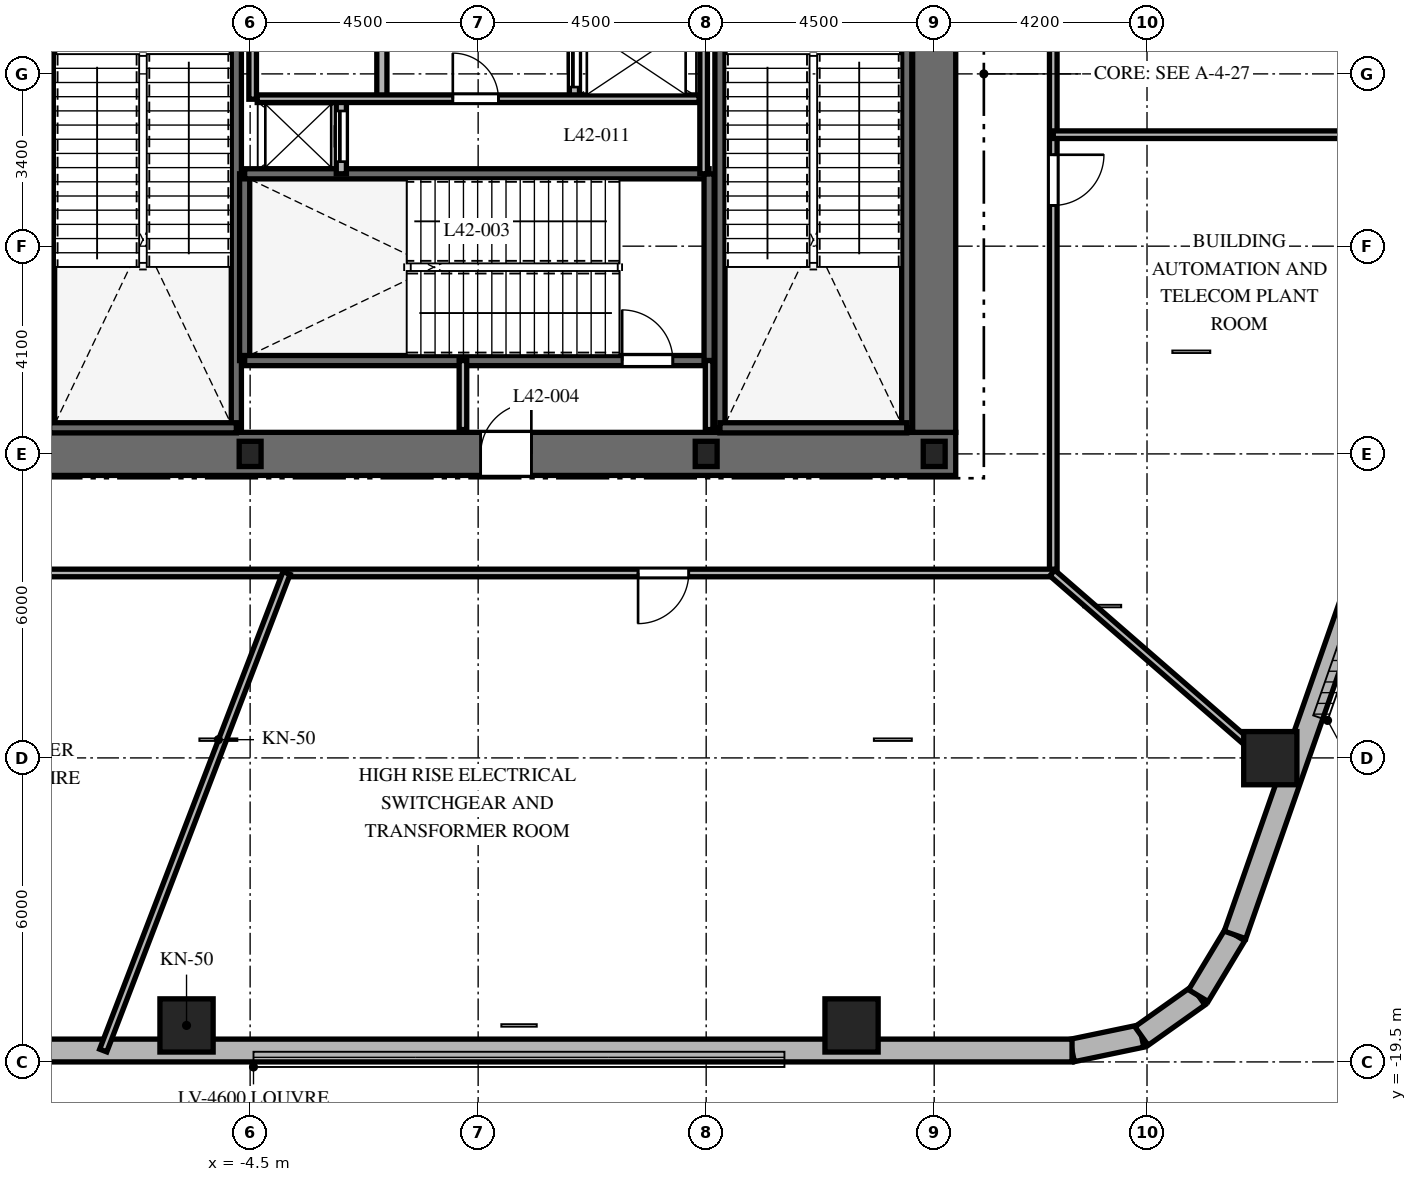
"""IFC4 building model, lengths in metres.
Left out: names, types, materials, properties, quantities, classifications, styles, units other than length and angle.
Written with IfcOpenShell. Run it as: python <this file> out.ifc"""

import sys

from ifc_helpers import new_model, si_unit, direction, frame, frame_2d, origin, origin_2d, place, context, subcontext, project, spatial, rectangle, i_section, extrude, element, fill, save


model = new_model("IFC4")
c1 = context("Model", 3, precision=1e-05, world=origin(), true_north=direction((0.0, 1.0)))
c2 = subcontext(c1, "Body", "Model", "MODEL_VIEW")
j1 = project(units=[si_unit("LENGTHUNIT", "METRE"), si_unit("PLANEANGLEUNIT", "RADIAN")], contexts=[c1])
p1 = place(None, origin())
s1 = spatial("IfcSite", under=j1, at=p1, CompositionType="ELEMENT")
p2 = place(p1, origin())
s2 = spatial("IfcBuilding", under=s1, at=p2, CompositionType="ELEMENT")
p3 = place(p2, frame((0.0, 0.0, 170.2)))
s3 = spatial("IfcBuildingStorey", under=s2, at=p3, CompositionType="ELEMENT", Elevation=170.2)
p4 = place(p3, frame((-9.425, -7.5, 0.0), z_axis=(0.0, 0.0, 1.0), x_axis=(1.0, 0.0, 0.0)))
e1 = element("IfcWall", 1, at=p4, inside=s3, PredefinedType="SHEAR", context=c2, shape_type="SweptSolid", body=[
    extrude(rectangle(XDim=18.85, YDim=0.85, at=frame_2d((9.425, 0.0))), origin(), (0.0, 0.0, 1.0), 5.4),
])
p5 = place(p4, frame((9.475, 0.0, 0.0)))
e2 = element("IfcOpeningElement", 2, at=p5, cuts=e1, PredefinedType="OPENING", context=c2, shape_type="SweptSolid", body=[
    extrude(rectangle(XDim=1.0, YDim=2.15, at=frame_2d((0.5, 1.075))), frame((0.0, 0.435, 0.0), z_axis=(0.0, -1.0, 0.0), x_axis=(1.0, 0.0, 0.0)), (0.0, 0.0, 1.0), 0.87),
])
p6 = place(p3, frame((9.0, -7.075, 0.0), z_axis=(0.0, 0.0, 1.0), x_axis=(0.0, 1.0, 0.0)))
e3 = element("IfcWall", 3, at=p6, inside=s3, PredefinedType="SHEAR", context=c2, shape_type="SweptSolid", body=[
    extrude(rectangle(XDim=14.15, YDim=0.85, at=frame_2d((7.075, 0.0))), origin(), (0.0, 0.0, 1.0), 5.4),
])
p7 = place(p6, frame((10.2, 0.0, 0.0)))
e4 = element("IfcOpeningElement", 4, at=p7, cuts=e3, PredefinedType="OPENING", context=c2, shape_type="SweptSolid", body=[
    extrude(rectangle(XDim=1.05, YDim=2.15, at=frame_2d((0.525, 1.075))), frame((0.0, 0.435, 0.0), z_axis=(0.0, -1.0, 0.0), x_axis=(1.0, 0.0, 0.0)), (0.0, 0.0, 1.0), 0.87),
])
for number, where, z_axis, x_axis in (
    (5, (-8.458, -6.985, 0.0), (0.0, 0.0, 1.0), (0.0, 1.0, 0.0)),
    (6, (-4.772, -6.985, 0.0), (0.0, 0.0, 1.0), (0.0, 1.0, 0.0)),
):
    element("IfcWall", number, at=place(p3, frame(where, z_axis=z_axis, x_axis=x_axis)), inside=s3, PredefinedType="SHEAR", context=c2, shape_type="SweptSolid", body=[
        extrude(rectangle(XDim=9.143, YDim=0.2, at=frame_2d((4.572, 0.0))), origin(), (0.0, 0.0, 1.0), 5.4),
    ])
p8 = place(p3, frame((-8.458, -6.985, 0.0), z_axis=(0.0, 0.0, 1.0), x_axis=(1.0, 0.0, 0.0)))
e7 = element("IfcWall", 7, at=p8, inside=s3, PredefinedType="SHEAR", context=c2, shape_type="SweptSolid", body=[
    extrude(rectangle(XDim=3.686, YDim=0.2, at=frame_2d((1.843, 0.0))), origin(), (0.0, 0.0, 1.0), 5.4),
])
for number, where, z_axis, x_axis in (
    (8, (4.772, -6.985, 0.0), (0.0, 0.0, 1.0), (0.0, 1.0, 0.0)),
    (9, (8.458, -6.985, 0.0), (0.0, 0.0, 1.0), (0.0, 1.0, 0.0)),
):
    element("IfcWall", number, at=place(p3, frame(where, z_axis=z_axis, x_axis=x_axis)), inside=s3, PredefinedType="SHEAR", context=c2, shape_type="SweptSolid", body=[
        extrude(rectangle(XDim=9.143, YDim=0.2, at=frame_2d((4.572, 0.0))), origin(), (0.0, 0.0, 1.0), 5.4),
    ])
for number, where, z_axis, x_axis in (
    (10, (4.772, -6.985, 0.0), (0.0, 0.0, 1.0), (1.0, 0.0, 0.0)),
    (11, (-4.608, -5.658, 0.0), (0.0, 0.0, 1.0), (0.0, 1.0, 0.0)),
):
    element("IfcWall", number, at=place(p3, frame(where, z_axis=z_axis, x_axis=x_axis)), inside=s3, PredefinedType="SHEAR", context=c2, shape_type="SweptSolid", body=[
        extrude(rectangle(XDim=3.686, YDim=0.2, at=frame_2d((1.843, 0.0))), origin(), (0.0, 0.0, 1.0), 5.4),
    ])
p9 = place(p3, frame((-4.608, -5.658, 0.0), z_axis=(0.0, 0.0, 1.0), x_axis=(1.0, 0.0, 0.0)))
e12 = element("IfcWall", 12, at=p9, inside=s3, PredefinedType="SHEAR", context=c2, shape_type="SweptSolid", body=[
    extrude(rectangle(XDim=9.166, YDim=0.2, at=frame_2d((4.583, 0.0))), origin(), (0.0, 0.0, 1.0), 5.4),
])
p10 = place(p9, frame((7.45, 0.0, 0.0)))
e13 = element("IfcOpeningElement", 13, at=p10, cuts=e12, PredefinedType="OPENING", context=c2, shape_type="SweptSolid", body=[
    extrude(rectangle(XDim=1.0, YDim=2.15, at=frame_2d((0.5, 1.075))), frame((0.0, 0.11, 0.0), z_axis=(0.0, -1.0, 0.0), x_axis=(1.0, 0.0, 0.0)), (0.0, 0.0, 1.0), 0.22),
])
p11 = place(p3, frame((-4.608, -1.972, 0.0), z_axis=(0.0, 0.0, 1.0), x_axis=(1.0, 0.0, 0.0)))
e14 = element("IfcWall", 14, at=p11, inside=s3, PredefinedType="SHEAR", context=c2, shape_type="SweptSolid", body=[
    extrude(rectangle(XDim=9.166, YDim=0.2, at=frame_2d((4.583, 0.0))), origin(), (0.0, 0.0, 1.0), 5.4),
])
p12 = place(p3, frame((4.558, -5.658, 0.0), z_axis=(0.0, 0.0, 1.0), x_axis=(0.0, 1.0, 0.0)))
e15 = element("IfcWall", 15, at=p12, inside=s3, PredefinedType="SHEAR", context=c2, shape_type="SweptSolid", body=[
    extrude(rectangle(XDim=3.686, YDim=0.2, at=frame_2d((1.843, 0.0))), origin(), (0.0, 0.0, 1.0), 5.4),
])
for number, where, z_axis, x_axis in (
    (16, (-4.5, -7.5, 0.0), (0.0, 0.0, 1.0), (1.0, 0.0, 0.0)),
    (17, (4.5, -7.5, 0.0), (0.0, 0.0, 1.0), (1.0, 0.0, 0.0)),
    (18, (9.0, -7.5, 0.0), (0.0, 0.0, 1.0), (1.0, 0.0, 0.0)),
):
    element("IfcColumn", number, at=place(p3, frame(where, z_axis=z_axis, x_axis=x_axis)), inside=s3, PredefinedType="COLUMN", context=c2, shape_type="SweptSolid", body=[
        extrude(i_section(OverallWidth=0.432, OverallDepth=0.498, WebThickness=0.056, FlangeThickness=0.089, at=origin_2d()), origin(), (0.0, 0.0, 1.0), 5.4),
    ])
for number, where, z_axis, x_axis in (
    (19, (-5.755, -18.78, 0.0), (0.0, 0.0, 1.0), (1.0, 0.0, 0.0)),
    (20, (7.369, -18.78, 0.0), (0.0, 0.0, 1.0), (1.0, 0.0, 0.0)),
    (21, (15.633, -13.505, 0.0), (0.0, 0.0, 1.0), (1.0, 0.0, 0.0)),
):
    element("IfcColumn", number, at=place(p3, frame(where, z_axis=z_axis, x_axis=x_axis)), inside=s3, PredefinedType="COLUMN", context=c2, shape_type="SweptSolid", body=[
        extrude(rectangle(XDim=1.05, YDim=1.05, at=origin_2d()), origin(), (0.0, 0.0, 1.0), 5.4),
    ])
p13 = place(p3, frame((11.72, -19.275, 0.0), z_axis=(0.0, 0.0, 1.0), x_axis=(0.97893106758, 0.204191001093, 0.0)))
e22 = element("IfcWall", 22, at=p13, inside=s3, PredefinedType="SOLIDWALL", context=c2, shape_type="SweptSolid", body=[
    extrude(rectangle(XDim=1.4, YDim=0.45, at=frame_2d((0.7, 0.0))), origin(), (0.0, 0.0, 1.0), 5.1),
])
p14 = place(p3, frame((13.091, -18.989, 0.0), z_axis=(0.0, 0.0, 1.0), x_axis=(0.815574637848, 0.578651890258, 0.0)))
e23 = element("IfcWall", 23, at=p14, inside=s3, PredefinedType="SOLIDWALL", context=c2, shape_type="SweptSolid", body=[
    extrude(rectangle(XDim=1.377, YDim=0.45, at=frame_2d((0.688, 0.0))), origin(), (0.0, 0.0, 1.0), 5.1),
])
p15 = place(p3, frame((14.214, -18.192, 0.0), z_axis=(0.0, 0.0, 1.0), x_axis=(0.516340945502, 0.856383108193, 0.0)))
e24 = element("IfcWall", 24, at=p15, inside=s3, PredefinedType="SOLIDWALL", context=c2, shape_type="SweptSolid", body=[
    extrude(rectangle(XDim=1.4, YDim=0.45, at=frame_2d((0.7, 0.0))), origin(), (0.0, 0.0, 1.0), 5.1),
])
p16 = place(p3, frame((-10.108, -19.275, 0.0), z_axis=(0.0, 0.0, 1.0), x_axis=(1.0, 0.0, 0.0)))
e25 = element("IfcWall", 25, at=p16, inside=s3, PredefinedType="SOLIDWALL", context=c2, shape_type="SweptSolid", body=[
    extrude(rectangle(XDim=21.829, YDim=0.45, at=frame_2d((10.915, 0.0))), origin(), (0.0, 0.0, 1.0), 5.1),
])
p17 = place(p3, frame((14.937, -16.993, 0.0), z_axis=(0.0, 0.0, 1.0), x_axis=(0.330431575061, 0.943829949834, 0.0)))
e26 = element("IfcWall", 26, at=p17, inside=s3, PredefinedType="SOLIDWALL", context=c2, shape_type="SweptSolid", body=[
    extrude(rectangle(XDim=17.689, YDim=0.45, at=frame_2d((8.844, 0.0))), origin(), (0.0, 0.0, 1.0), 5.1),
])
for number, where, z_axis, x_axis in (
    (27, (-0.3, -7.02, 0.0), (0.0, 0.0, 1.0), (0.0, 1.0, 0.0)),
    (28, (4.558, -7.02, 0.0), (0.0, 0.0, 1.0), (0.0, 1.0, 0.0)),
):
    element("IfcWall", number, at=place(p3, frame(where, z_axis=z_axis, x_axis=x_axis)), inside=s3, PredefinedType="PARTITIONING", context=c2, shape_type="SweptSolid", body=[
        extrude(rectangle(XDim=1.362, YDim=0.15, at=frame_2d((0.681, 0.0))), origin(), (0.0, 0.0, 1.0), 5.1),
    ])
p18 = place(p3, frame((-2.7, -1.972, 0.0), z_axis=(0.0, 0.0, 1.0), x_axis=(0.0, 1.0, 0.0)))
e29 = element("IfcWall", 29, at=p18, inside=s3, PredefinedType="PARTITIONING", context=c2, shape_type="SweptSolid", body=[
    extrude(rectangle(XDim=1.472, YDim=0.2, at=frame_2d((0.736, 0.0))), origin(), (0.0, 0.0, 1.0), 5.1),
])
p19 = place(p18, frame((0.24, 0.0, 0.0)))
e30 = element("IfcOpeningElement", 30, at=p19, cuts=e29, PredefinedType="OPENING", context=c2, shape_type="SweptSolid", body=[
    extrude(rectangle(XDim=1.0, YDim=2.2, at=frame_2d((0.5, 1.1))), frame((0.0, 0.11, 0.0), z_axis=(0.0, -1.0, 0.0), x_axis=(1.0, 0.0, 0.0)), (0.0, 0.0, 1.0), 0.22),
])
p20 = place(p3, frame((-4.45, -0.5, 0.0), z_axis=(0.0, 0.0, 1.0), x_axis=(0.0, 1.0, 0.0)))
e31 = element("IfcWall", 31, at=p20, inside=s3, PredefinedType="PARTITIONING", context=c2, shape_type="SweptSolid", body=[
    extrude(rectangle(XDim=2.75, YDim=0.15, at=frame_2d((1.375, 0.0))), origin(), (0.0, 0.0, 1.0), 5.1),
])
p21 = place(p3, frame((4.45, -1.972, 0.0), z_axis=(0.0, 0.0, 1.0), x_axis=(0.0, 1.0, 0.0)))
e32 = element("IfcWall", 32, at=p21, inside=s3, PredefinedType="PARTITIONING", context=c2, shape_type="SweptSolid", body=[
    extrude(rectangle(XDim=4.222, YDim=0.15, at=frame_2d((2.111, 0.0))), origin(), (0.0, 0.0, 1.0), 5.1),
])
p22 = place(p3, frame((-1.9, -0.5, 0.0), z_axis=(0.0, 0.0, 1.0), x_axis=(0.0, 1.0, 0.0)))
e33 = element("IfcWall", 33, at=p22, inside=s3, PredefinedType="PARTITIONING", context=c2, shape_type="SweptSolid", body=[
    extrude(rectangle(XDim=4.44, YDim=0.2, at=frame_2d((2.22, 0.0))), origin(), (0.0, 0.0, 1.0), 5.1),
])
p23 = place(p22, frame((1.5, 0.0, 0.0)))
e34 = element("IfcOpeningElement", 34, at=p23, cuts=e33, PredefinedType="OPENING", context=c2, shape_type="SweptSolid", body=[
    extrude(rectangle(XDim=0.85, YDim=2.03, at=frame_2d((0.425, 1.015))), frame((0.0, 0.11, 0.0), z_axis=(0.0, -1.0, 0.0), x_axis=(1.0, 0.0, 0.0)), (0.0, 0.0, 1.0), 0.22),
])
p24 = place(p3, frame((1.9, -0.5, 0.0), z_axis=(0.0, 0.0, 1.0), x_axis=(0.0, 1.0, 0.0)))
e35 = element("IfcWall", 35, at=p24, inside=s3, PredefinedType="PARTITIONING", context=c2, shape_type="SweptSolid", body=[
    extrude(rectangle(XDim=4.44, YDim=0.2, at=frame_2d((2.22, 0.0))), origin(), (0.0, 0.0, 1.0), 5.1),
])
p25 = place(p24, frame((0.24, 0.0, 0.0)))
e36 = element("IfcOpeningElement", 36, at=p25, cuts=e35, PredefinedType="OPENING", context=c2, shape_type="SweptSolid", body=[
    extrude(rectangle(XDim=1.0, YDim=2.2, at=frame_2d((0.5, 1.1))), frame((0.0, 0.11, 0.0), z_axis=(0.0, -1.0, 0.0), x_axis=(1.0, 0.0, 0.0)), (0.0, 0.0, 1.0), 0.22),
])
p26 = place(p24, frame((1.72, 0.0, 0.0)))
e37 = element("IfcOpeningElement", 37, at=p26, cuts=e35, PredefinedType="OPENING", context=c2, shape_type="SweptSolid", body=[
    extrude(rectangle(XDim=1.0, YDim=2.2, at=frame_2d((0.5, 1.1))), frame((0.0, 0.11, 0.0), z_axis=(0.0, -1.0, 0.0), x_axis=(1.0, 0.0, 0.0)), (0.0, 0.0, 1.0), 0.22),
])
p27 = place(p24, frame((3.2, 0.0, 0.0)))
e38 = element("IfcOpeningElement", 38, at=p27, cuts=e35, PredefinedType="OPENING", context=c2, shape_type="SweptSolid", body=[
    extrude(rectangle(XDim=1.0, YDim=2.2, at=frame_2d((0.5, 1.1))), frame((0.0, 0.11, 0.0), z_axis=(0.0, -1.0, 0.0), x_axis=(1.0, 0.0, 0.0)), (0.0, 0.0, 1.0), 0.22),
])
p28 = place(p3, frame((-4.36, -0.49, 0.0), z_axis=(0.0, 0.0, 1.0), x_axis=(1.0, 0.0, 0.0)))
e39 = element("IfcWall", 39, at=p28, inside=s3, PredefinedType="PARTITIONING", context=c2, shape_type="SweptSolid", body=[
    extrude(rectangle(XDim=8.72, YDim=0.15, at=frame_2d((4.36, 0.0))), origin(), (0.0, 0.0, 1.0), 5.1),
])
p29 = place(p28, frame((3.86, 0.0, 0.0)))
e40 = element("IfcOpeningElement", 40, at=p29, cuts=e39, PredefinedType="OPENING", context=c2, shape_type="SweptSolid", body=[
    extrude(rectangle(XDim=0.9, YDim=2.03, at=frame_2d((0.45, 1.015))), frame((0.0, 0.085, 0.0), z_axis=(0.0, -1.0, 0.0), x_axis=(1.0, 0.0, 0.0)), (0.0, 0.0, 1.0), 0.17),
])
p30 = place(p3, frame((11.35, 9.85, 0.0), z_axis=(0.0, 0.0, 1.0), x_axis=(0.0, -1.0, 0.0)))
e41 = element("IfcWall", 41, at=p30, inside=s3, PredefinedType="PARTITIONING", context=c2, shape_type="SweptSolid", body=[
    extrude(rectangle(XDim=19.7, YDim=0.15, at=frame_2d((9.85, 0.0))), origin(), (0.0, 0.0, 1.0), 4.316),
])
p31 = place(p30, frame((7.825, 0.0, 0.0)))
e42 = element("IfcOpeningElement", 42, at=p31, cuts=e41, PredefinedType="OPENING", context=c2, shape_type="SweptSolid", body=[
    extrude(rectangle(XDim=1.05, YDim=2.15, at=frame_2d((0.525, 1.075))), frame((0.0, 0.085, 0.0), z_axis=(0.0, -1.0, 0.0), x_axis=(1.0, 0.0, 0.0)), (0.0, 0.0, 1.0), 0.17),
])
p32 = place(p30, frame((11.446, 0.0, 0.0)))
e43 = element("IfcOpeningElement", 43, at=p32, cuts=e41, PredefinedType="OPENING", context=c2, shape_type="SweptSolid", body=[
    extrude(rectangle(XDim=1.0, YDim=2.15, at=frame_2d((0.5, 1.075))), frame((0.0, 0.085, 0.0), z_axis=(0.0, -1.0, 0.0), x_axis=(1.0, 0.0, 0.0)), (0.0, 0.0, 1.0), 0.17),
])
p33 = place(p3, frame((11.35, -9.85, 0.0), z_axis=(0.0, 0.0, 1.0), x_axis=(-1.0, 0.0, 0.0)))
e44 = element("IfcWall", 44, at=p33, inside=s3, PredefinedType="PARTITIONING", context=c2, shape_type="SweptSolid", body=[
    extrude(rectangle(XDim=22.7, YDim=0.15, at=frame_2d((11.35, 0.0))), origin(), (0.0, 0.0, 1.0), 4.316),
])
p34 = place(p33, frame((7.194, 0.0, 0.0)))
e45 = element("IfcOpeningElement", 45, at=p34, cuts=e44, PredefinedType="OPENING", context=c2, shape_type="SweptSolid", body=[
    extrude(rectangle(XDim=1.0, YDim=2.15, at=frame_2d((0.5, 1.075))), frame((0.0, 0.085, 0.0), z_axis=(0.0, -1.0, 0.0), x_axis=(1.0, 0.0, 0.0)), (0.0, 0.0, 1.0), 0.17),
])
p35 = place(p3, frame((11.35, -1.2, 0.0), z_axis=(0.0, 0.0, 1.0), x_axis=(1.0, 0.0, 0.0)))
e46 = element("IfcWall", 46, at=p35, inside=s3, PredefinedType="PARTITIONING", context=c2, shape_type="SweptSolid", body=[
    extrude(rectangle(XDim=6.15, YDim=0.15, at=frame_2d((3.075, 0.0))), origin(), (0.0, 0.0, 1.0), 4.541),
])
p36 = place(p3, frame((-3.781, -9.85, 0.0), z_axis=(0.0, 0.0, 1.0), x_axis=(-0.358374542439, -0.933577895696, 0.0)))
e47 = element("IfcWall", 47, at=p36, inside=s3, PredefinedType="PARTITIONING", context=c2, shape_type="SweptSolid", body=[
    extrude(rectangle(XDim=10.095, YDim=0.15, at=frame_2d((5.048, 0.0))), origin(), (0.0, 0.0, 1.0), 4.316),
])
p37 = place(p3, frame((11.331, -9.85, 0.0), z_axis=(0.0, 0.0, 1.0), x_axis=(0.754718202942, -0.656049109555, 0.0)))
e48 = element("IfcWall", 48, at=p37, inside=s3, PredefinedType="PARTITIONING", context=c2, shape_type="SweptSolid", body=[
    extrude(rectangle(XDim=6.203, YDim=0.15, at=frame_2d((3.102, 0.0))), origin(), (0.0, 0.0, 1.0), 4.34),
])
p38 = place(p10, origin())
e49 = element("IfcDoor", 49, at=p38, inside=s3, OperationType="SINGLE_SWING_LEFT", PredefinedType="DOOR", context=c2, shape_type="SweptSolid", body=[
    extrude(rectangle(XDim=1.0, YDim=2.15, at=frame_2d((0.5, 1.075))), frame((0.0, 0.025, 0.0), z_axis=(0.0, -1.0, 0.0), x_axis=(1.0, 0.0, 0.0)), (0.0, 0.0, 1.0), 0.05),
])
fill(e13, e49)
p39 = place(p5, origin())
e50 = element("IfcDoor", 50, at=p39, inside=s3, OperationType="SINGLE_SWING_RIGHT", PredefinedType="DOOR", context=c2, shape_type="SweptSolid", body=[
    extrude(rectangle(XDim=1.0, YDim=2.15, at=frame_2d((0.5, 1.075))), frame((0.0, 0.025, 0.0), z_axis=(0.0, -1.0, 0.0), x_axis=(1.0, 0.0, 0.0)), (0.0, 0.0, 1.0), 0.05),
])
fill(e2, e50)
p40 = place(p19, origin())
e51 = element("IfcDoor", 51, at=p40, inside=s3, OperationType="SLIDING_TO_LEFT", PredefinedType="DOOR", context=c2, shape_type="SweptSolid", body=[
    extrude(rectangle(XDim=1.0, YDim=2.2, at=frame_2d((0.5, 1.1))), frame((0.0, 0.025, 0.0), z_axis=(0.0, -1.0, 0.0), x_axis=(1.0, 0.0, 0.0)), (0.0, 0.0, 1.0), 0.05),
])
fill(e30, e51)
p41 = place(p25, origin())
e52 = element("IfcDoor", 52, at=p41, inside=s3, OperationType="SLIDING_TO_RIGHT", PredefinedType="DOOR", context=c2, shape_type="SweptSolid", body=[
    extrude(rectangle(XDim=1.0, YDim=2.2, at=frame_2d((0.5, 1.1))), frame((0.0, 0.025, 0.0), z_axis=(0.0, -1.0, 0.0), x_axis=(1.0, 0.0, 0.0)), (0.0, 0.0, 1.0), 0.05),
])
fill(e36, e52)
p42 = place(p29, origin())
e53 = element("IfcDoor", 53, at=p42, inside=s3, OperationType="SINGLE_SWING_LEFT", PredefinedType="DOOR", context=c2, shape_type="SweptSolid", body=[
    extrude(rectangle(XDim=0.9, YDim=2.03, at=frame_2d((0.45, 1.015))), frame((0.0, 0.025, 0.0), z_axis=(0.0, -1.0, 0.0), x_axis=(1.0, 0.0, 0.0)), (0.0, 0.0, 1.0), 0.05),
])
fill(e40, e53)
p43 = place(p34, origin())
e54 = element("IfcDoor", 54, at=p43, inside=s3, OperationType="SINGLE_SWING_RIGHT", PredefinedType="DOOR", context=c2, shape_type="SweptSolid", body=[
    extrude(rectangle(XDim=1.0, YDim=2.15, at=frame_2d((0.5, 1.075))), frame((0.0, 0.025, 0.0), z_axis=(0.0, -1.0, 0.0), x_axis=(1.0, 0.0, 0.0)), (0.0, 0.0, 1.0), 0.05),
])
fill(e45, e54)
p44 = place(p32, origin())
e55 = element("IfcDoor", 55, at=p44, inside=s3, OperationType="SINGLE_SWING_LEFT", PredefinedType="DOOR", context=c2, shape_type="SweptSolid", body=[
    extrude(rectangle(XDim=1.0, YDim=2.15, at=frame_2d((0.5, 1.075))), frame((0.0, 0.025, 0.0), z_axis=(0.0, -1.0, 0.0), x_axis=(1.0, 0.0, 0.0)), (0.0, 0.0, 1.0), 0.05),
])
fill(e43, e55)
save(model, sys.argv[1])
